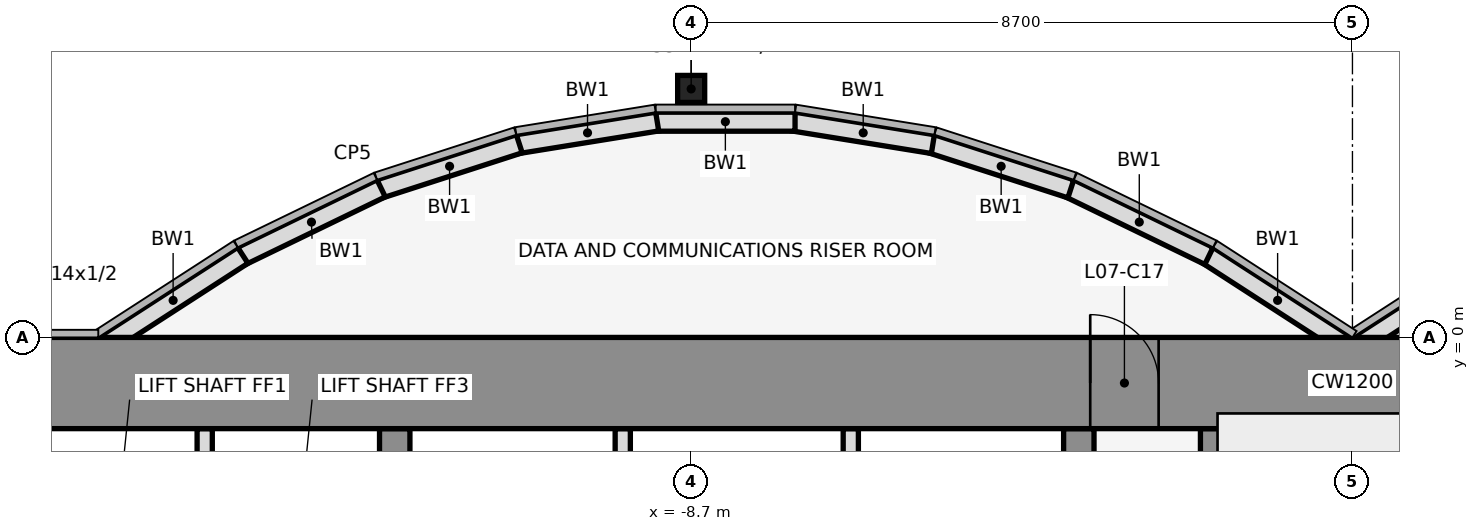
"""IFC4 building model, lengths in metres.
Left out: names, types, materials, properties, quantities, classifications, styles, units other than length and angle.
Written with IfcOpenShell. Run it as: python <this file> out.ifc"""

import sys

from ifc_helpers import new_model, si_unit, direction, frame, frame_2d, origin, origin_2d, place, context, subcontext, project, spatial, rectangle, hollow_rectangle, extrude, element, fill, save


model = new_model("IFC4")
c1 = context("Model", 3, precision=1e-05, world=origin(), true_north=direction((0.0, 1.0)))
c2 = subcontext(c1, "Body", "Model", "MODEL_VIEW")
j1 = project(units=[si_unit("LENGTHUNIT", "METRE"), si_unit("PLANEANGLEUNIT", "RADIAN")], contexts=[c1])
p1 = place(None, origin())
s1 = spatial("IfcSite", under=j1, at=p1, CompositionType="ELEMENT")
p2 = place(p1, origin())
s2 = spatial("IfcBuilding", under=s1, at=p2, CompositionType="ELEMENT")
p3 = place(p2, frame((0.0, 0.0, 39.5)))
s3 = spatial("IfcBuildingStorey", under=s2, at=p3, CompositionType="ELEMENT", Elevation=39.5)
p4 = place(p3, frame((-8.7, 3.269, 0.0), z_axis=(0.0, 0.0, 1.0), x_axis=(1.0, 0.0, 0.0)))
e1 = element("IfcColumn", 1, at=p4, inside=s3, PredefinedType="COLUMN", context=c2, shape_type="SweptSolid", body=[
    extrude(hollow_rectangle(XDim=0.356, YDim=0.356, WallThickness=0.012, at=origin_2d()), origin(), (0.0, 0.0, 1.0), 4.5),
])
for number, where, z_axis, x_axis in (
    (2, (1.901, 1.08, 0.0), (0.0, 0.0, 1.0), (-0.84, -0.543, 0.0)),
    (3, (-0.068, -0.105, 0.0), (0.0, 0.0, 1.0), (-0.84, 0.543, 0.0)),
):
    element("IfcWall", number, at=place(p3, frame(where, z_axis=z_axis, x_axis=x_axis)), inside=s3, PredefinedType="STANDARD", context=c2, shape_type="SweptSolid", body=[
        extrude(rectangle(XDim=2.183, YDim=0.25, at=frame_2d((1.091, 0.0))), origin(), (0.0, 0.0, 1.0), 4.35),
    ])
p5 = place(p3, frame((-1.888, 1.073, 0.0), z_axis=(0.0, 0.0, 1.0), x_axis=(-0.89982408427, 0.436252928206, 0.0)))
e4 = element("IfcWall", 4, at=p5, inside=s3, PredefinedType="STANDARD", context=c2, shape_type="SweptSolid", body=[
    extrude(rectangle(XDim=2.038, YDim=0.25, at=frame_2d((1.019, 0.0))), origin(), (0.0, 0.0, 1.0), 4.35),
])
p6 = place(p3, frame((-3.705, 1.955, 0.0), z_axis=(0.0, 0.0, 1.0), x_axis=(-0.951495806175, 0.307661714928, 0.0)))
e5 = element("IfcWall", 5, at=p6, inside=s3, PredefinedType="STANDARD", context=c2, shape_type="SweptSolid", body=[
    extrude(rectangle(XDim=1.927, YDim=0.25, at=frame_2d((0.963, 0.0))), origin(), (0.0, 0.0, 1.0), 4.35),
])
p7 = place(p3, frame((-5.52, 2.543, 0.0), z_axis=(0.0, 0.0, 1.0), x_axis=(-0.987181718931, 0.159600293885, 0.0)))
e6 = element("IfcWall", 6, at=p7, inside=s3, PredefinedType="STANDARD", context=c2, shape_type="SweptSolid", body=[
    extrude(rectangle(XDim=1.857, YDim=0.25, at=frame_2d((0.929, 0.0))), origin(), (0.0, 0.0, 1.0), 4.35),
])
p8 = place(p3, frame((-7.333, 2.838, 0.0), z_axis=(0.0, 0.0, 1.0), x_axis=(-1.0, 0.0, 0.0)))
e7 = element("IfcWall", 7, at=p8, inside=s3, PredefinedType="STANDARD", context=c2, shape_type="SweptSolid", body=[
    extrude(rectangle(XDim=1.833, YDim=0.25, at=frame_2d((0.917, 0.0))), origin(), (0.0, 0.0, 1.0), 4.35),
])
p9 = place(p3, frame((-9.147, 2.84, 0.0), z_axis=(0.0, 0.0, 1.0), x_axis=(-0.987181718931, -0.159600293885, 0.0)))
e8 = element("IfcWall", 8, at=p9, inside=s3, PredefinedType="STANDARD", context=c2, shape_type="SweptSolid", body=[
    extrude(rectangle(XDim=1.857, YDim=0.25, at=frame_2d((0.929, 0.0))), origin(), (0.0, 0.0, 1.0), 4.35),
])
p10 = place(p3, frame((-10.962, 2.548, 0.0), z_axis=(0.0, 0.0, 1.0), x_axis=(-0.951495806175, -0.307661714928, 0.0)))
e9 = element("IfcWall", 9, at=p10, inside=s3, PredefinedType="STANDARD", context=c2, shape_type="SweptSolid", body=[
    extrude(rectangle(XDim=1.927, YDim=0.25, at=frame_2d((0.963, 0.0))), origin(), (0.0, 0.0, 1.0), 4.35),
])
p11 = place(p3, frame((-12.779, 1.962, 0.0), z_axis=(0.0, 0.0, 1.0), x_axis=(-0.89982408427, -0.436252928206, 0.0)))
e10 = element("IfcWall", 10, at=p11, inside=s3, PredefinedType="STANDARD", context=c2, shape_type="SweptSolid", body=[
    extrude(rectangle(XDim=2.038, YDim=0.25, at=frame_2d((1.019, 0.0))), origin(), (0.0, 0.0, 1.0), 4.35),
])
p12 = place(p3, frame((-14.599, 1.08, 0.0), z_axis=(0.0, 0.0, 1.0), x_axis=(-0.83981312244, -0.542875602121, 0.0)))
e11 = element("IfcWall", 11, at=p12, inside=s3, PredefinedType="STANDARD", context=c2, shape_type="SweptSolid", body=[
    extrude(rectangle(XDim=2.183, YDim=0.25, at=frame_2d((1.091, 0.0))), origin(), (0.0, 0.0, 1.0), 4.35),
])
p13 = place(p3, frame((-15.1, -4.6, 0.0), z_axis=(0.0, 0.0, 1.0), x_axis=(0.0, 1.0, 0.0)))
e12 = element("IfcWall", 12, at=p13, inside=s3, PredefinedType="PARTITIONING", context=c2, shape_type="SweptSolid", body=[
    extrude(rectangle(XDim=3.4, YDim=0.2, at=frame_2d((1.7, 0.0))), origin(), (0.0, 0.0, 1.0), 3.418),
])
p14 = place(p3, frame((-12.6, -11.8, 0.0), z_axis=(0.0, 0.0, 1.0), x_axis=(0.0, 1.0, 0.0)))
e13 = element("IfcWall", 13, at=p14, inside=s3, PredefinedType="SHEAR", context=c2, shape_type="SweptSolid", body=[
    extrude(rectangle(XDim=10.6, YDim=0.4, at=frame_2d((5.3, 0.0))), origin(), (0.0, 0.0, 1.0), 4.5),
])
p15 = place(p14, frame((4.75, 0.0, 0.0)))
e14 = element("IfcOpeningElement", 14, at=p15, cuts=e13, PredefinedType="OPENING", context=c2, shape_type="SweptSolid", body=[
    extrude(rectangle(XDim=1.1, YDim=2.1, at=frame_2d((0.55, 1.05))), frame((0.0, 0.212, 0.0), z_axis=(0.0, -1.0, 0.0), x_axis=(1.0, 0.0, 0.0)), (0.0, 0.0, 1.0), 0.424),
])
for number, where, z_axis, x_axis in (
    (15, (-9.6, -4.6, 0.0), (0.0, 0.0, 1.0), (0.0, 1.0, 0.0)),
    (16, (-6.6, -4.6, 0.0), (0.0, 0.0, 1.0), (0.0, 1.0, 0.0)),
):
    element("IfcWall", number, at=place(p3, frame(where, z_axis=z_axis, x_axis=x_axis)), inside=s3, PredefinedType="PARTITIONING", context=c2, shape_type="SweptSolid", body=[
        extrude(rectangle(XDim=3.4, YDim=0.2, at=frame_2d((1.7, 0.0))), origin(), (0.0, 0.0, 1.0), 3.418),
    ])
p16 = place(p3, frame((-3.6, -11.8, 0.0), z_axis=(0.0, 0.0, 1.0), x_axis=(0.0, 1.0, 0.0)))
e17 = element("IfcWall", 17, at=p16, inside=s3, PredefinedType="SHEAR", context=c2, shape_type="SweptSolid", body=[
    extrude(rectangle(XDim=10.6, YDim=0.4, at=frame_2d((5.3, 0.0))), origin(), (0.0, 0.0, 1.0), 4.5),
])
p17 = place(p16, frame((4.85, 0.0, 0.0)))
e18 = element("IfcOpeningElement", 18, at=p17, cuts=e17, PredefinedType="OPENING", context=c2, shape_type="SweptSolid", body=[
    extrude(rectangle(XDim=0.9, YDim=2.1, at=frame_2d((0.45, 1.05))), frame((0.0, 0.212, 0.0), z_axis=(0.0, -1.0, 0.0), x_axis=(1.0, 0.0, 0.0)), (0.0, 0.0, 1.0), 0.424),
])
p18 = place(p3, frame((-1.8, -11.8, 0.0), z_axis=(0.0, 0.0, 1.0), x_axis=(0.0, 1.0, 0.0)))
e19 = element("IfcWall", 19, at=p18, inside=s3, PredefinedType="SHEAR", context=c2, shape_type="SweptSolid", body=[
    extrude(rectangle(XDim=10.6, YDim=0.4, at=frame_2d((5.3, 0.0))), origin(), (0.0, 0.0, 1.0), 4.5),
])
p19 = place(p3, frame((-22.0, -0.6, 0.0), z_axis=(0.0, 0.0, 1.0), x_axis=(1.0, 0.0, 0.0)))
e20 = element("IfcWall", 20, at=p19, inside=s3, PredefinedType="SHEAR", context=c2, shape_type="SweptSolid", body=[
    extrude(rectangle(XDim=44.0, YDim=1.2, at=frame_2d((22.0, 0.0))), origin(), (0.0, 0.0, 1.0), 4.5),
])
p20 = place(p19, frame((18.55, 0.0, 0.0)))
e21 = element("IfcOpeningElement", 21, at=p20, cuts=e20, PredefinedType="OPENING", context=c2, shape_type="SweptSolid", body=[
    extrude(rectangle(XDim=0.9, YDim=2.1, at=frame_2d((0.45, 1.05))), frame((0.0, 0.612, 0.0), z_axis=(0.0, -1.0, 0.0), x_axis=(1.0, 0.0, 0.0)), (0.0, 0.0, 1.0), 1.224),
])
p21 = place(p19, frame((24.55, 0.0, 0.0)))
e22 = element("IfcOpeningElement", 22, at=p21, cuts=e20, PredefinedType="OPENING", context=c2, shape_type="SweptSolid", body=[
    extrude(rectangle(XDim=0.9, YDim=2.1, at=frame_2d((0.45, 1.05))), frame((0.0, 0.612, 0.0), z_axis=(0.0, -1.0, 0.0), x_axis=(1.0, 0.0, 0.0)), (0.0, 0.0, 1.0), 1.224),
])
p22 = place(p20, origin())
e23 = element("IfcDoor", 23, at=p22, inside=s3, OperationType="SINGLE_SWING_LEFT", PredefinedType="DOOR", context=c2, shape_type="SweptSolid", body=[
    extrude(rectangle(XDim=0.9, YDim=2.1, at=frame_2d((0.45, 1.05))), frame((0.0, 0.025, 0.0), z_axis=(0.0, -1.0, 0.0), x_axis=(1.0, 0.0, 0.0)), (0.0, 0.0, 1.0), 0.05),
])
fill(e21, e23)
save(model, sys.argv[1])
